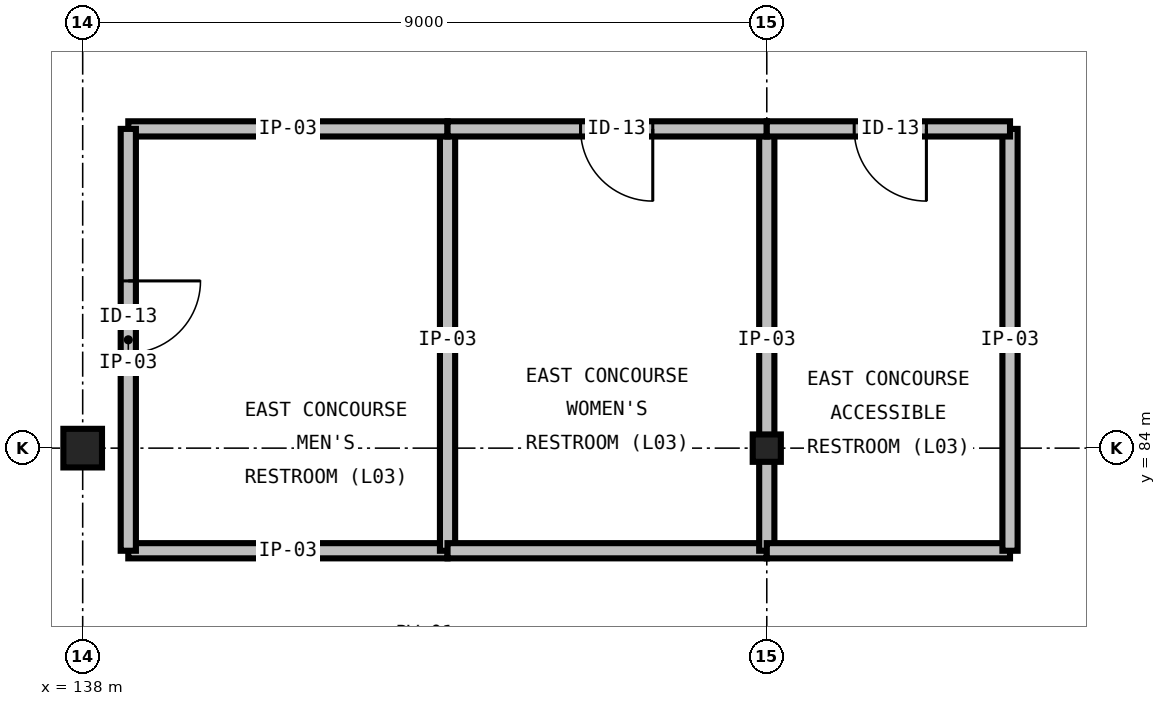
"""IFC4 building model, lengths in metres.
Left out: names, types, materials, properties, quantities, classifications, styles, units other than length and angle.
Written with IfcOpenShell. Run it as: python <this file> out.ifc"""

import sys

from ifc_helpers import new_model, si_unit, direction, frame, frame_2d, origin, origin_2d, place, context, subcontext, project, spatial, rectangle, hollow_rectangle, i_section, extrude, element, fill, save


model = new_model("IFC4")
c1 = context("Model", 3, precision=1e-05, world=origin(), true_north=direction((0.0, 1.0)))
c2 = subcontext(c1, "Body", "Model", "MODEL_VIEW")
j1 = project(units=[si_unit("LENGTHUNIT", "METRE"), si_unit("PLANEANGLEUNIT", "RADIAN")], contexts=[c1])
p1 = place(None, origin())
s1 = spatial("IfcSite", under=j1, at=p1, CompositionType="ELEMENT")
p2 = place(p1, origin())
s2 = spatial("IfcBuilding", under=s1, at=p2, CompositionType="ELEMENT")
p3 = place(p2, frame((0.0, 0.0, 18.0)))
s3 = spatial("IfcBuildingStorey", under=s2, at=p3, CompositionType="ELEMENT", Elevation=18.0)
p4 = place(p3, frame((138.0, 84.0, 0.0), z_axis=(0.0, 0.0, 1.0), x_axis=(1.0, 0.0, 0.0)))
e1 = element("IfcColumn", 1, at=p4, inside=s3, PredefinedType="COLUMN", context=c2, shape_type="SweptSolid", body=[
    extrude(hollow_rectangle(XDim=0.508, YDim=0.508, WallThickness=0.015, at=origin_2d()), origin(), (0.0, 0.0, 1.0), 5.4),
])
p5 = place(p3, frame((147.0, 84.0, 0.0), z_axis=(0.0, 0.0, 1.0), x_axis=(1.0, 0.0, 0.0)))
e2 = element("IfcColumn", 2, at=p5, inside=s3, PredefinedType="COLUMN", context=c2, shape_type="SweptSolid", body=[
    extrude(i_section(OverallWidth=0.37, OverallDepth=0.36, WebThickness=0.012, FlangeThickness=0.02, FilletRadius=0.031, at=origin_2d()), origin(), (0.0, 0.0, 1.0), 5.4),
])
p6 = place(p3, frame((138.6, 82.65, 0.0), z_axis=(0.0, 0.0, 1.0), x_axis=(1.0, 0.0, 0.0)))
e3 = element("IfcWall", 3, at=p6, inside=s3, PredefinedType="PARTITIONING", context=c2, shape_type="SweptSolid", body=[
    extrude(rectangle(XDim=4.2, YDim=0.2, at=frame_2d((2.1, 0.0))), origin(), (0.0, 0.0, 1.0), 5.08),
])
p7 = place(p3, frame((142.8, 82.65, 0.0), z_axis=(0.0, 0.0, 1.0), x_axis=(0.0, 1.0, 0.0)))
e4 = element("IfcWall", 4, at=p7, inside=s3, PredefinedType="PARTITIONING", context=c2, shape_type="SweptSolid", body=[
    extrude(rectangle(XDim=5.55, YDim=0.2, at=frame_2d((2.775, 0.0))), origin(), (0.0, 0.0, 1.0), 5.08),
])
p8 = place(p3, frame((142.8, 88.2, 0.0), z_axis=(0.0, 0.0, 1.0), x_axis=(-1.0, 0.0, 0.0)))
e5 = element("IfcWall", 5, at=p8, inside=s3, PredefinedType="PARTITIONING", context=c2, shape_type="SweptSolid", body=[
    extrude(rectangle(XDim=4.2, YDim=0.2, at=frame_2d((2.1, 0.0))), origin(), (0.0, 0.0, 1.0), 5.08),
])
p9 = place(p3, frame((138.6, 88.2, 0.0), z_axis=(0.0, 0.0, 1.0), x_axis=(0.0, -1.0, 0.0)))
e6 = element("IfcWall", 6, at=p9, inside=s3, PredefinedType="PARTITIONING", context=c2, shape_type="SweptSolid", body=[
    extrude(rectangle(XDim=5.55, YDim=0.2, at=frame_2d((2.775, 0.0))), origin(), (0.0, 0.0, 1.0), 5.08),
])
p10 = place(p9, frame((2.0, 0.0, 0.0)))
e7 = element("IfcOpeningElement", 7, at=p10, cuts=e6, PredefinedType="OPENING", context=c2, shape_type="SweptSolid", body=[
    extrude(rectangle(XDim=0.95, YDim=2.15, at=frame_2d((0.475, 1.075))), frame((0.0, 0.115, 0.0), z_axis=(0.0, -1.0, 0.0), x_axis=(1.0, 0.0, 0.0)), (0.0, 0.0, 1.0), 0.23),
])
p11 = place(p3, frame((142.8, 82.65, 0.0), z_axis=(0.0, 0.0, 1.0), x_axis=(1.0, 0.0, 0.0)))
e8 = element("IfcWall", 8, at=p11, inside=s3, PredefinedType="PARTITIONING", context=c2, shape_type="SweptSolid", body=[
    extrude(rectangle(XDim=4.2, YDim=0.2, at=frame_2d((2.1, 0.0))), origin(), (0.0, 0.0, 1.0), 5.08),
])
p12 = place(p3, frame((147.0, 82.65, 0.0), z_axis=(0.0, 0.0, 1.0), x_axis=(0.0, 1.0, 0.0)))
e9 = element("IfcWall", 9, at=p12, inside=s3, PredefinedType="PARTITIONING", context=c2, shape_type="SweptSolid", body=[
    extrude(rectangle(XDim=5.55, YDim=0.2, at=frame_2d((2.775, 0.0))), origin(), (0.0, 0.0, 1.0), 4.23),
])
p13 = place(p3, frame((147.0, 88.2, 0.0), z_axis=(0.0, 0.0, 1.0), x_axis=(-1.0, 0.0, 0.0)))
e10 = element("IfcWall", 10, at=p13, inside=s3, PredefinedType="PARTITIONING", context=c2, shape_type="SweptSolid", body=[
    extrude(rectangle(XDim=4.2, YDim=0.2, at=frame_2d((2.1, 0.0))), origin(), (0.0, 0.0, 1.0), 5.08),
])
p14 = place(p13, frame((1.5, 0.0, 0.0)))
e11 = element("IfcOpeningElement", 11, at=p14, cuts=e10, PredefinedType="OPENING", context=c2, shape_type="SweptSolid", body=[
    extrude(rectangle(XDim=0.95, YDim=2.15, at=frame_2d((0.475, 1.075))), frame((0.0, 0.115, 0.0), z_axis=(0.0, -1.0, 0.0), x_axis=(1.0, 0.0, 0.0)), (0.0, 0.0, 1.0), 0.23),
])
p15 = place(p3, frame((147.0, 82.65, 0.0), z_axis=(0.0, 0.0, 1.0), x_axis=(1.0, 0.0, 0.0)))
e12 = element("IfcWall", 12, at=p15, inside=s3, PredefinedType="PARTITIONING", context=c2, shape_type="SweptSolid", body=[
    extrude(rectangle(XDim=3.2, YDim=0.2, at=frame_2d((1.6, 0.0))), origin(), (0.0, 0.0, 1.0), 5.08),
])
p16 = place(p3, frame((150.2, 82.65, 0.0), z_axis=(0.0, 0.0, 1.0), x_axis=(0.0, 1.0, 0.0)))
e13 = element("IfcWall", 13, at=p16, inside=s3, PredefinedType="PARTITIONING", context=c2, shape_type="SweptSolid", body=[
    extrude(rectangle(XDim=5.55, YDim=0.2, at=frame_2d((2.775, 0.0))), origin(), (0.0, 0.0, 1.0), 5.08),
])
p17 = place(p3, frame((150.2, 88.2, 0.0), z_axis=(0.0, 0.0, 1.0), x_axis=(-1.0, 0.0, 0.0)))
e14 = element("IfcWall", 14, at=p17, inside=s3, PredefinedType="PARTITIONING", context=c2, shape_type="SweptSolid", body=[
    extrude(rectangle(XDim=3.2, YDim=0.2, at=frame_2d((1.6, 0.0))), origin(), (0.0, 0.0, 1.0), 5.08),
])
p18 = place(p17, frame((1.1, 0.0, 0.0)))
e15 = element("IfcOpeningElement", 15, at=p18, cuts=e14, PredefinedType="OPENING", context=c2, shape_type="SweptSolid", body=[
    extrude(rectangle(XDim=0.95, YDim=2.15, at=frame_2d((0.475, 1.075))), frame((0.0, 0.115, 0.0), z_axis=(0.0, -1.0, 0.0), x_axis=(1.0, 0.0, 0.0)), (0.0, 0.0, 1.0), 0.23),
])
p19 = place(p10, origin())
e16 = element("IfcDoor", 16, at=p19, inside=s3, OperationType="SINGLE_SWING_LEFT", PredefinedType="DOOR", context=c2, shape_type="SweptSolid", body=[
    extrude(rectangle(XDim=0.95, YDim=2.15, at=frame_2d((0.475, 1.075))), frame((0.0, 0.025, 0.0), z_axis=(0.0, -1.0, 0.0), x_axis=(1.0, 0.0, 0.0)), (0.0, 0.0, 1.0), 0.05),
])
fill(e7, e16)
p20 = place(p14, origin())
e17 = element("IfcDoor", 17, at=p20, inside=s3, OperationType="SINGLE_SWING_LEFT", PredefinedType="DOOR", context=c2, shape_type="SweptSolid", body=[
    extrude(rectangle(XDim=0.95, YDim=2.15, at=frame_2d((0.475, 1.075))), frame((0.0, 0.025, 0.0), z_axis=(0.0, -1.0, 0.0), x_axis=(1.0, 0.0, 0.0)), (0.0, 0.0, 1.0), 0.05),
])
fill(e11, e17)
p21 = place(p18, origin())
e18 = element("IfcDoor", 18, at=p21, inside=s3, OperationType="SINGLE_SWING_LEFT", PredefinedType="DOOR", context=c2, shape_type="SweptSolid", body=[
    extrude(rectangle(XDim=0.95, YDim=2.15, at=frame_2d((0.475, 1.075))), frame((0.0, 0.025, 0.0), z_axis=(0.0, -1.0, 0.0), x_axis=(1.0, 0.0, 0.0)), (0.0, 0.0, 1.0), 0.05),
])
fill(e15, e18)
save(model, sys.argv[1])
